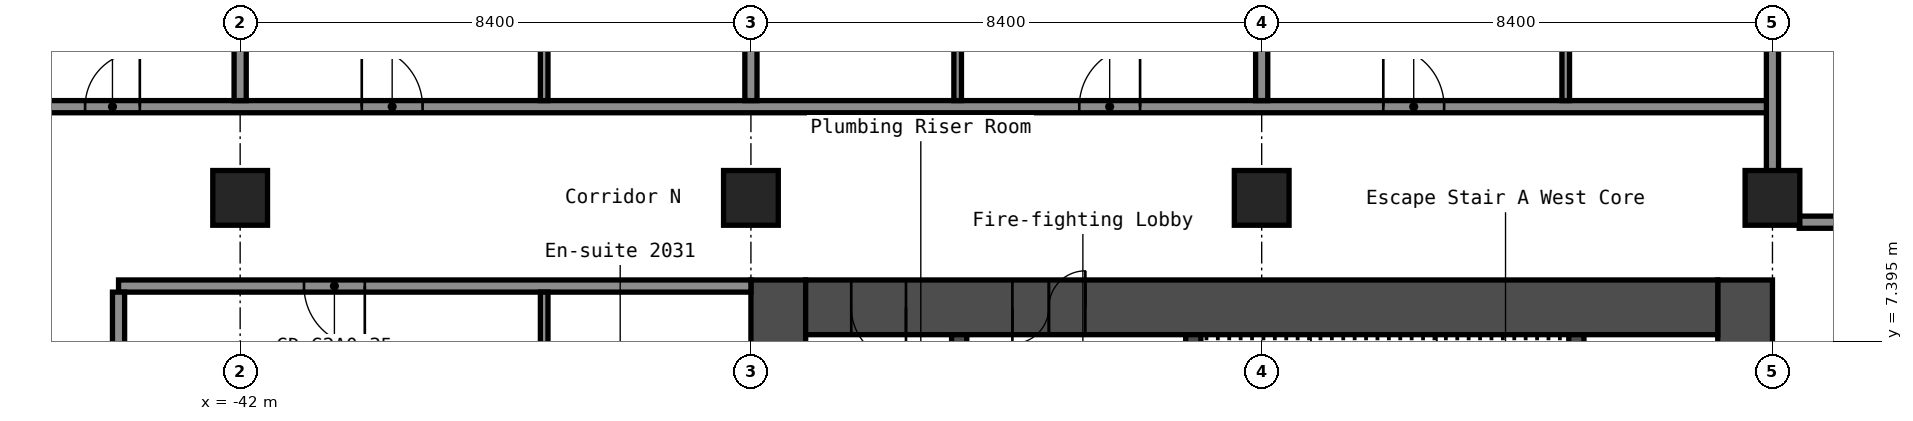
"""IFC4 building model, lengths in metres.
Left out: names, types, materials, properties, quantities, classifications, styles, units other than length and angle.
Written with IfcOpenShell. Run it as: python <this file> out.ifc"""

import sys

from ifc_helpers import new_model, si_unit, direction, frame, frame_2d, origin, origin_2d, place, context, subcontext, project, spatial, rectangle, hollow_rectangle, extrude, element, fill, save


model = new_model("IFC4")
c1 = context("Model", 3, precision=1e-05, world=origin(), true_north=direction((0.0, 1.0)))
c2 = subcontext(c1, "Body", "Model", "MODEL_VIEW")
j1 = project(units=[si_unit("LENGTHUNIT", "METRE"), si_unit("PLANEANGLEUNIT", "RADIAN")], contexts=[c1])
p1 = place(None, origin())
s1 = spatial("IfcSite", under=j1, at=p1, CompositionType="ELEMENT")
p2 = place(p1, origin())
s2 = spatial("IfcBuilding", under=s1, at=p2, CompositionType="ELEMENT")
p3 = place(p2, frame((0.0, 0.0, 75.4)))
s3 = spatial("IfcBuildingStorey", under=s2, at=p3, CompositionType="ELEMENT", Elevation=75.4)
for number, where, z_axis, x_axis in (
    (1, (-42.0, 9.75, 0.0), (0.0, 0.0, 1.0), (1.0, 0.0, 0.0)),
    (2, (-33.6, 9.75, 0.0), (0.0, 0.0, 1.0), (1.0, 0.0, 0.0)),
    (3, (-25.2, 9.75, 0.0), (0.0, 0.0, 1.0), (1.0, 0.0, 0.0)),
    (4, (-16.8, 9.75, 0.0), (0.0, 0.0, 1.0), (1.0, 0.0, 0.0)),
):
    element("IfcColumn", number, at=place(p3, frame(where, z_axis=z_axis, x_axis=x_axis)), inside=s3, PredefinedType="COLUMN", context=c2, shape_type="SweptSolid", body=[
        extrude(hollow_rectangle(XDim=0.9, YDim=0.9, WallThickness=0.036, at=origin_2d()), origin(), (0.0, 0.0, 1.0), 2.8),
    ])
p4 = place(p3, frame((-17.25, -8.4, 0.0), z_axis=(0.0, 0.0, 1.0), x_axis=(0.0, 1.0, 0.0)))
e5 = element("IfcWall", 5, at=p4, inside=s3, PredefinedType="SHEAR", context=c2, shape_type="SweptSolid", body=[
    extrude(rectangle(XDim=16.8, YDim=0.9, at=frame_2d((8.4, 0.0))), origin(), (0.0, 0.0, 1.0), 2.8),
])
p5 = place(p4, frame((7.6, 0.0, 0.0)))
e6 = element("IfcOpeningElement", 6, at=p5, cuts=e5, PredefinedType="OPENING", context=c2, shape_type="SweptSolid", body=[
    extrude(rectangle(XDim=1.2, YDim=2.1, at=frame_2d((0.6, 1.05))), frame((0.0, 0.46, 0.0), z_axis=(0.0, -1.0, 0.0), x_axis=(1.0, 0.0, 0.0)), (0.0, 0.0, 1.0), 0.92),
])
p6 = place(p3, frame((-33.15, -8.4, 0.0), z_axis=(0.0, 0.0, 1.0), x_axis=(0.0, 1.0, 0.0)))
e7 = element("IfcWall", 7, at=p6, inside=s3, PredefinedType="SHEAR", context=c2, shape_type="SweptSolid", body=[
    extrude(rectangle(XDim=16.8, YDim=0.9, at=frame_2d((8.4, 0.0))), origin(), (0.0, 0.0, 1.0), 2.8),
])
p7 = place(p3, frame((-32.7, 7.95, 0.0), z_axis=(0.0, 0.0, 1.0), x_axis=(1.0, 0.0, 0.0)))
e8 = element("IfcWall", 8, at=p7, inside=s3, PredefinedType="SHEAR", context=c2, shape_type="SweptSolid", body=[
    extrude(rectangle(XDim=15.0, YDim=0.9, at=frame_2d((7.5, 0.0))), origin(), (0.0, 0.0, 1.0), 2.8),
])
p8 = place(p7, frame((3.4, 0.0, 0.0)))
e9 = element("IfcOpeningElement", 9, at=p8, cuts=e8, PredefinedType="OPENING", context=c2, shape_type="SweptSolid", body=[
    extrude(rectangle(XDim=1.2, YDim=2.1, at=frame_2d((0.6, 1.05))), frame((0.0, 0.46, 0.0), z_axis=(0.0, -1.0, 0.0), x_axis=(1.0, 0.0, 0.0)), (0.0, 0.0, 1.0), 0.92),
])
p9 = place(p7, frame((0.75, 0.0, 0.0)))
e10 = element("IfcOpeningElement", 10, at=p9, cuts=e8, PredefinedType="OPENING", context=c2, shape_type="SweptSolid", body=[
    extrude(rectangle(XDim=0.9, YDim=2.1, at=frame_2d((0.45, 1.05))), frame((0.0, 0.46, 0.0), z_axis=(0.0, -1.0, 0.0), x_axis=(1.0, 0.0, 0.0)), (0.0, 0.0, 1.0), 0.92),
])
p10 = place(p3, frame((-20.025, 1.2, 0.0), z_axis=(0.0, 0.0, 1.0), x_axis=(0.0, 1.0, 0.0)))
e11 = element("IfcWall", 11, at=p10, inside=s3, PredefinedType="SHEAR", context=c2, shape_type="SweptSolid", body=[
    extrude(rectangle(XDim=6.3, YDim=0.25, at=frame_2d((3.15, 0.0))), origin(), (0.0, 0.0, 1.0), 2.8),
])
p11 = place(p3, frame((-26.325, 3.75, 0.0), z_axis=(0.0, 0.0, 1.0), x_axis=(0.0, 1.0, 0.0)))
e12 = element("IfcWall", 12, at=p11, inside=s3, PredefinedType="SHEAR", context=c2, shape_type="SweptSolid", body=[
    extrude(rectangle(XDim=3.75, YDim=0.25, at=frame_2d((1.875, 0.0))), origin(), (0.0, 0.0, 1.0), 2.8),
])
p12 = place(p11, frame((1.25, 0.0, 0.0)))
e13 = element("IfcOpeningElement", 13, at=p12, cuts=e12, PredefinedType="OPENING", context=c2, shape_type="SweptSolid", body=[
    extrude(rectangle(XDim=1.2, YDim=2.1, at=frame_2d((0.6, 1.05))), frame((0.0, 0.135, 0.0), z_axis=(0.0, -1.0, 0.0), x_axis=(1.0, 0.0, 0.0)), (0.0, 0.0, 1.0), 0.27),
])
p13 = place(p3, frame((-30.175, 1.45, 0.0), z_axis=(0.0, 0.0, 1.0), x_axis=(0.0, 1.0, 0.0)))
e14 = element("IfcWall", 14, at=p13, inside=s3, PredefinedType="SHEAR", context=c2, shape_type="SweptSolid", body=[
    extrude(rectangle(XDim=6.05, YDim=0.25, at=frame_2d((3.025, 0.0))), origin(), (0.0, 0.0, 1.0), 2.8),
])
p14 = place(p13, frame((2.625, 0.0, 0.0)))
e15 = element("IfcOpeningElement", 15, at=p14, cuts=e14, PredefinedType="OPENING", context=c2, shape_type="SweptSolid", body=[
    extrude(rectangle(XDim=1.1, YDim=2.1, at=frame_2d((0.55, 1.05))), frame((0.0, 0.135, 0.0), z_axis=(0.0, -1.0, 0.0), x_axis=(1.0, 0.0, 0.0)), (0.0, 0.0, 1.0), 0.27),
])
p15 = place(p3, frame((-44.0, 8.3, 0.0), z_axis=(0.0, 0.0, 1.0), x_axis=(1.0, 0.0, 0.0)))
e16 = element("IfcWall", 16, at=p15, inside=s3, PredefinedType="PARTITIONING", context=c2, shape_type="SweptSolid", body=[
    extrude(rectangle(XDim=10.4, YDim=0.2, at=frame_2d((5.2, 0.0))), origin(), (0.0, 0.0, 1.0), 2.8),
])
p16 = place(p15, frame((3.05, 0.0, 0.0)))
e17 = element("IfcOpeningElement", 17, at=p16, cuts=e16, PredefinedType="OPENING", context=c2, shape_type="SweptSolid", body=[
    extrude(rectangle(XDim=1.0, YDim=2.1, at=frame_2d((0.5, 1.05))), frame((0.0, 0.11, 0.0), z_axis=(0.0, -1.0, 0.0), x_axis=(1.0, 0.0, 0.0)), (0.0, 0.0, 1.0), 0.22),
])
p17 = place(p3, frame((-16.36, 9.35, 0.0), z_axis=(0.0, 0.0, 1.0), x_axis=(1.0, 0.0, 0.0)))
e18 = element("IfcWall", 18, at=p17, inside=s3, PredefinedType="PARTITIONING", context=c2, shape_type="SweptSolid", body=[
    extrude(rectangle(XDim=32.72, YDim=0.2, at=frame_2d((16.36, 0.0))), origin(), (0.0, 0.0, 1.0), 2.8),
])
p18 = place(p17, frame((1.545, 0.0, 0.0)))
e19 = element("IfcOpeningElement", 19, at=p18, cuts=e18, PredefinedType="OPENING", context=c2, shape_type="SweptSolid", body=[
    extrude(rectangle(XDim=0.9, YDim=2.1, at=frame_2d((0.45, 1.05))), frame((0.0, 0.11, 0.0), z_axis=(0.0, -1.0, 0.0), x_axis=(1.0, 0.0, 0.0)), (0.0, 0.0, 1.0), 0.22),
])
p19 = place(p17, frame((5.745, 0.0, 0.0)))
e20 = element("IfcOpeningElement", 20, at=p19, cuts=e18, PredefinedType="OPENING", context=c2, shape_type="SweptSolid", body=[
    extrude(rectangle(XDim=0.9, YDim=2.1, at=frame_2d((0.45, 1.05))), frame((0.0, 0.11, 0.0), z_axis=(0.0, -1.0, 0.0), x_axis=(1.0, 0.0, 0.0)), (0.0, 0.0, 1.0), 0.22),
])
p20 = place(p17, frame((9.275, 0.0, 0.0)))
e21 = element("IfcOpeningElement", 21, at=p20, cuts=e18, PredefinedType="OPENING", context=c2, shape_type="SweptSolid", body=[
    extrude(rectangle(XDim=0.9, YDim=2.1, at=frame_2d((0.45, 1.05))), frame((0.0, 0.11, 0.0), z_axis=(0.0, -1.0, 0.0), x_axis=(1.0, 0.0, 0.0)), (0.0, 0.0, 1.0), 0.22),
])
p21 = place(p17, frame((13.475, 0.0, 0.0)))
e22 = element("IfcOpeningElement", 22, at=p21, cuts=e18, PredefinedType="OPENING", context=c2, shape_type="SweptSolid", body=[
    extrude(rectangle(XDim=0.9, YDim=2.1, at=frame_2d((0.45, 1.05))), frame((0.0, 0.11, 0.0), z_axis=(0.0, -1.0, 0.0), x_axis=(1.0, 0.0, 0.0)), (0.0, 0.0, 1.0), 0.22),
])
p22 = place(p17, frame((17.76, 0.0, 0.0)))
e23 = element("IfcOpeningElement", 23, at=p22, cuts=e18, PredefinedType="OPENING", context=c2, shape_type="SweptSolid", body=[
    extrude(rectangle(XDim=0.9, YDim=2.1, at=frame_2d((0.45, 1.05))), frame((0.0, 0.11, 0.0), z_axis=(0.0, -1.0, 0.0), x_axis=(1.0, 0.0, 0.0)), (0.0, 0.0, 1.0), 0.22),
])
p23 = place(p17, frame((21.96, 0.0, 0.0)))
e24 = element("IfcOpeningElement", 24, at=p23, cuts=e18, PredefinedType="OPENING", context=c2, shape_type="SweptSolid", body=[
    extrude(rectangle(XDim=0.9, YDim=2.1, at=frame_2d((0.45, 1.05))), frame((0.0, 0.11, 0.0), z_axis=(0.0, -1.0, 0.0), x_axis=(1.0, 0.0, 0.0)), (0.0, 0.0, 1.0), 0.22),
])
p24 = place(p17, frame((28.46, 0.0, 0.0)))
e25 = element("IfcOpeningElement", 25, at=p24, cuts=e18, PredefinedType="OPENING", context=c2, shape_type="SweptSolid", body=[
    extrude(rectangle(XDim=1.0, YDim=2.1, at=frame_2d((0.5, 1.05))), frame((0.0, 0.11, 0.0), z_axis=(0.0, -1.0, 0.0), x_axis=(1.0, 0.0, 0.0)), (0.0, 0.0, 1.0), 0.22),
])
p25 = place(p3, frame((-46.5, 11.25, 0.0), z_axis=(0.0, 0.0, 1.0), x_axis=(1.0, 0.0, 0.0)))
e26 = element("IfcWall", 26, at=p25, inside=s3, PredefinedType="PARTITIONING", context=c2, shape_type="SweptSolid", body=[
    extrude(rectangle(XDim=29.7, YDim=0.2, at=frame_2d((14.85, 0.0))), origin(), (0.0, 0.0, 1.0), 2.8),
])
p26 = place(p25, frame((1.95, 0.0, 0.0)))
e27 = element("IfcOpeningElement", 27, at=p26, cuts=e26, PredefinedType="OPENING", context=c2, shape_type="SweptSolid", body=[
    extrude(rectangle(XDim=0.9, YDim=2.1, at=frame_2d((0.45, 1.05))), frame((0.0, 0.11, 0.0), z_axis=(0.0, -1.0, 0.0), x_axis=(1.0, 0.0, 0.0)), (0.0, 0.0, 1.0), 0.22),
])
p27 = place(p25, frame((6.5, 0.0, 0.0)))
e28 = element("IfcOpeningElement", 28, at=p27, cuts=e26, PredefinedType="OPENING", context=c2, shape_type="SweptSolid", body=[
    extrude(rectangle(XDim=1.0, YDim=2.1, at=frame_2d((0.5, 1.05))), frame((0.0, 0.11, 0.0), z_axis=(0.0, -1.0, 0.0), x_axis=(1.0, 0.0, 0.0)), (0.0, 0.0, 1.0), 0.22),
])
p28 = place(p25, frame((18.3, 0.0, 0.0)))
e29 = element("IfcOpeningElement", 29, at=p28, cuts=e26, PredefinedType="OPENING", context=c2, shape_type="SweptSolid", body=[
    extrude(rectangle(XDim=1.0, YDim=2.1, at=frame_2d((0.5, 1.05))), frame((0.0, 0.11, 0.0), z_axis=(0.0, -1.0, 0.0), x_axis=(1.0, 0.0, 0.0)), (0.0, 0.0, 1.0), 0.22),
])
p29 = place(p25, frame((23.3, 0.0, 0.0)))
e30 = element("IfcOpeningElement", 30, at=p29, cuts=e26, PredefinedType="OPENING", context=c2, shape_type="SweptSolid", body=[
    extrude(rectangle(XDim=1.0, YDim=2.1, at=frame_2d((0.5, 1.05))), frame((0.0, 0.11, 0.0), z_axis=(0.0, -1.0, 0.0), x_axis=(1.0, 0.0, 0.0)), (0.0, 0.0, 1.0), 0.22),
])
p30 = place(p3, frame((-44.0, -8.2, 0.0), z_axis=(0.0, 0.0, 1.0), x_axis=(0.0, 1.0, 0.0)))
e31 = element("IfcWall", 31, at=p30, inside=s3, PredefinedType="PARTITIONING", context=c2, shape_type="SweptSolid", body=[
    extrude(rectangle(XDim=16.4, YDim=0.2, at=frame_2d((8.2, 0.0))), origin(), (0.0, 0.0, 1.0), 2.8),
])
p31 = place(p3, frame((-42.0, 11.35, 0.0), z_axis=(0.0, 0.0, 1.0), x_axis=(0.0, 1.0, 0.0)))
e32 = element("IfcWall", 32, at=p31, inside=s3, PredefinedType="PARTITIONING", context=c2, shape_type="SweptSolid", body=[
    extrude(rectangle(XDim=12.2, YDim=0.2, at=frame_2d((6.1, 0.0))), origin(), (0.0, 0.0, 1.0), 2.8),
])
p32 = place(p3, frame((-37.0, 4.9, 0.0), z_axis=(0.0, 0.0, 1.0), x_axis=(0.0, 1.0, 0.0)))
e33 = element("IfcWall", 33, at=p32, inside=s3, PredefinedType="PARTITIONING", context=c2, shape_type="SweptSolid", body=[
    extrude(rectangle(XDim=3.3, YDim=0.125, at=frame_2d((1.65, 0.0))), origin(), (0.0, 0.0, 1.0), 2.8),
])
p33 = place(p3, frame((-37.0, 11.35, 0.0), z_axis=(0.0, 0.0, 1.0), x_axis=(0.0, 1.0, 0.0)))
e34 = element("IfcWall", 34, at=p33, inside=s3, PredefinedType="PARTITIONING", context=c2, shape_type="SweptSolid", body=[
    extrude(rectangle(XDim=3.3, YDim=0.125, at=frame_2d((1.65, 0.0))), origin(), (0.0, 0.0, 1.0), 2.8),
])
p34 = place(p3, frame((-33.6, 11.35, 0.0), z_axis=(0.0, 0.0, 1.0), x_axis=(0.0, 1.0, 0.0)))
e35 = element("IfcWall", 35, at=p34, inside=s3, PredefinedType="PARTITIONING", context=c2, shape_type="SweptSolid", body=[
    extrude(rectangle(XDim=12.2, YDim=0.2, at=frame_2d((6.1, 0.0))), origin(), (0.0, 0.0, 1.0), 2.8),
])
p35 = place(p3, frame((-30.2, 11.35, 0.0), z_axis=(0.0, 0.0, 1.0), x_axis=(0.0, 1.0, 0.0)))
e36 = element("IfcWall", 36, at=p35, inside=s3, PredefinedType="PARTITIONING", context=c2, shape_type="SweptSolid", body=[
    extrude(rectangle(XDim=3.3, YDim=0.125, at=frame_2d((1.65, 0.0))), origin(), (0.0, 0.0, 1.0), 2.8),
])
p36 = place(p3, frame((-25.2, 11.35, 0.0), z_axis=(0.0, 0.0, 1.0), x_axis=(0.0, 1.0, 0.0)))
e37 = element("IfcWall", 37, at=p36, inside=s3, PredefinedType="PARTITIONING", context=c2, shape_type="SweptSolid", body=[
    extrude(rectangle(XDim=12.2, YDim=0.2, at=frame_2d((6.1, 0.0))), origin(), (0.0, 0.0, 1.0), 2.8),
])
p37 = place(p3, frame((-20.2, 11.35, 0.0), z_axis=(0.0, 0.0, 1.0), x_axis=(0.0, 1.0, 0.0)))
e38 = element("IfcWall", 38, at=p37, inside=s3, PredefinedType="PARTITIONING", context=c2, shape_type="SweptSolid", body=[
    extrude(rectangle(XDim=3.3, YDim=0.125, at=frame_2d((1.65, 0.0))), origin(), (0.0, 0.0, 1.0), 2.8),
])
p38 = place(p3, frame((-16.8, 10.19, 0.0), z_axis=(0.0, 0.0, 1.0), x_axis=(0.0, 1.0, 0.0)))
e39 = element("IfcWall", 39, at=p38, inside=s3, PredefinedType="PARTITIONING", context=c2, shape_type="SweptSolid", body=[
    extrude(rectangle(XDim=13.36, YDim=0.2, at=frame_2d((6.68, 0.0))), origin(), (0.0, 0.0, 1.0), 2.8),
])
p39 = place(p8, origin())
e40 = element("IfcDoor", 40, at=p39, inside=s3, OperationType="DOUBLE_DOOR_SINGLE_SWING", PredefinedType="DOOR", context=c2, shape_type="SweptSolid", body=[
    extrude(rectangle(XDim=1.2, YDim=2.1, at=frame_2d((0.6, 1.05))), frame((0.0, 0.025, 0.0), z_axis=(0.0, -1.0, 0.0), x_axis=(1.0, 0.0, 0.0)), (0.0, 0.0, 1.0), 0.05),
])
fill(e9, e40)
p40 = place(p9, origin())
e41 = element("IfcDoor", 41, at=p40, inside=s3, OperationType="SINGLE_SWING_RIGHT", PredefinedType="DOOR", context=c2, shape_type="SweptSolid", body=[
    extrude(rectangle(XDim=0.9, YDim=2.1, at=frame_2d((0.45, 1.05))), frame((0.0, 0.025, 0.0), z_axis=(0.0, -1.0, 0.0), x_axis=(1.0, 0.0, 0.0)), (0.0, 0.0, 1.0), 0.05),
])
fill(e10, e41)
p41 = place(p16, origin())
e42 = element("IfcDoor", 42, at=p41, inside=s3, OperationType="SINGLE_SWING_RIGHT", PredefinedType="DOOR", context=c2, shape_type="SweptSolid", body=[
    extrude(rectangle(XDim=1.0, YDim=2.1, at=frame_2d((0.5, 1.05))), frame((0.0, 0.025, 0.0), z_axis=(0.0, -1.0, 0.0), x_axis=(1.0, 0.0, 0.0)), (0.0, 0.0, 1.0), 0.05),
])
fill(e17, e42)
p42 = place(p26, origin())
e43 = element("IfcDoor", 43, at=p42, inside=s3, OperationType="SINGLE_SWING_LEFT", PredefinedType="DOOR", context=c2, shape_type="SweptSolid", body=[
    extrude(rectangle(XDim=0.9, YDim=2.1, at=frame_2d((0.45, 1.05))), frame((0.0, 0.025, 0.0), z_axis=(0.0, -1.0, 0.0), x_axis=(1.0, 0.0, 0.0)), (0.0, 0.0, 1.0), 0.05),
])
fill(e27, e43)
p43 = place(p27, origin())
e44 = element("IfcDoor", 44, at=p43, inside=s3, OperationType="SINGLE_SWING_RIGHT", PredefinedType="DOOR", context=c2, shape_type="SweptSolid", body=[
    extrude(rectangle(XDim=1.0, YDim=2.1, at=frame_2d((0.5, 1.05))), frame((0.0, 0.025, 0.0), z_axis=(0.0, -1.0, 0.0), x_axis=(1.0, 0.0, 0.0)), (0.0, 0.0, 1.0), 0.05),
])
fill(e28, e44)
p44 = place(p28, origin())
e45 = element("IfcDoor", 45, at=p44, inside=s3, OperationType="SINGLE_SWING_LEFT", PredefinedType="DOOR", context=c2, shape_type="SweptSolid", body=[
    extrude(rectangle(XDim=1.0, YDim=2.1, at=frame_2d((0.5, 1.05))), frame((0.0, 0.025, 0.0), z_axis=(0.0, -1.0, 0.0), x_axis=(1.0, 0.0, 0.0)), (0.0, 0.0, 1.0), 0.05),
])
fill(e29, e45)
p45 = place(p29, origin())
e46 = element("IfcDoor", 46, at=p45, inside=s3, OperationType="SINGLE_SWING_RIGHT", PredefinedType="DOOR", context=c2, shape_type="SweptSolid", body=[
    extrude(rectangle(XDim=1.0, YDim=2.1, at=frame_2d((0.5, 1.05))), frame((0.0, 0.025, 0.0), z_axis=(0.0, -1.0, 0.0), x_axis=(1.0, 0.0, 0.0)), (0.0, 0.0, 1.0), 0.05),
])
fill(e30, e46)
save(model, sys.argv[1])
